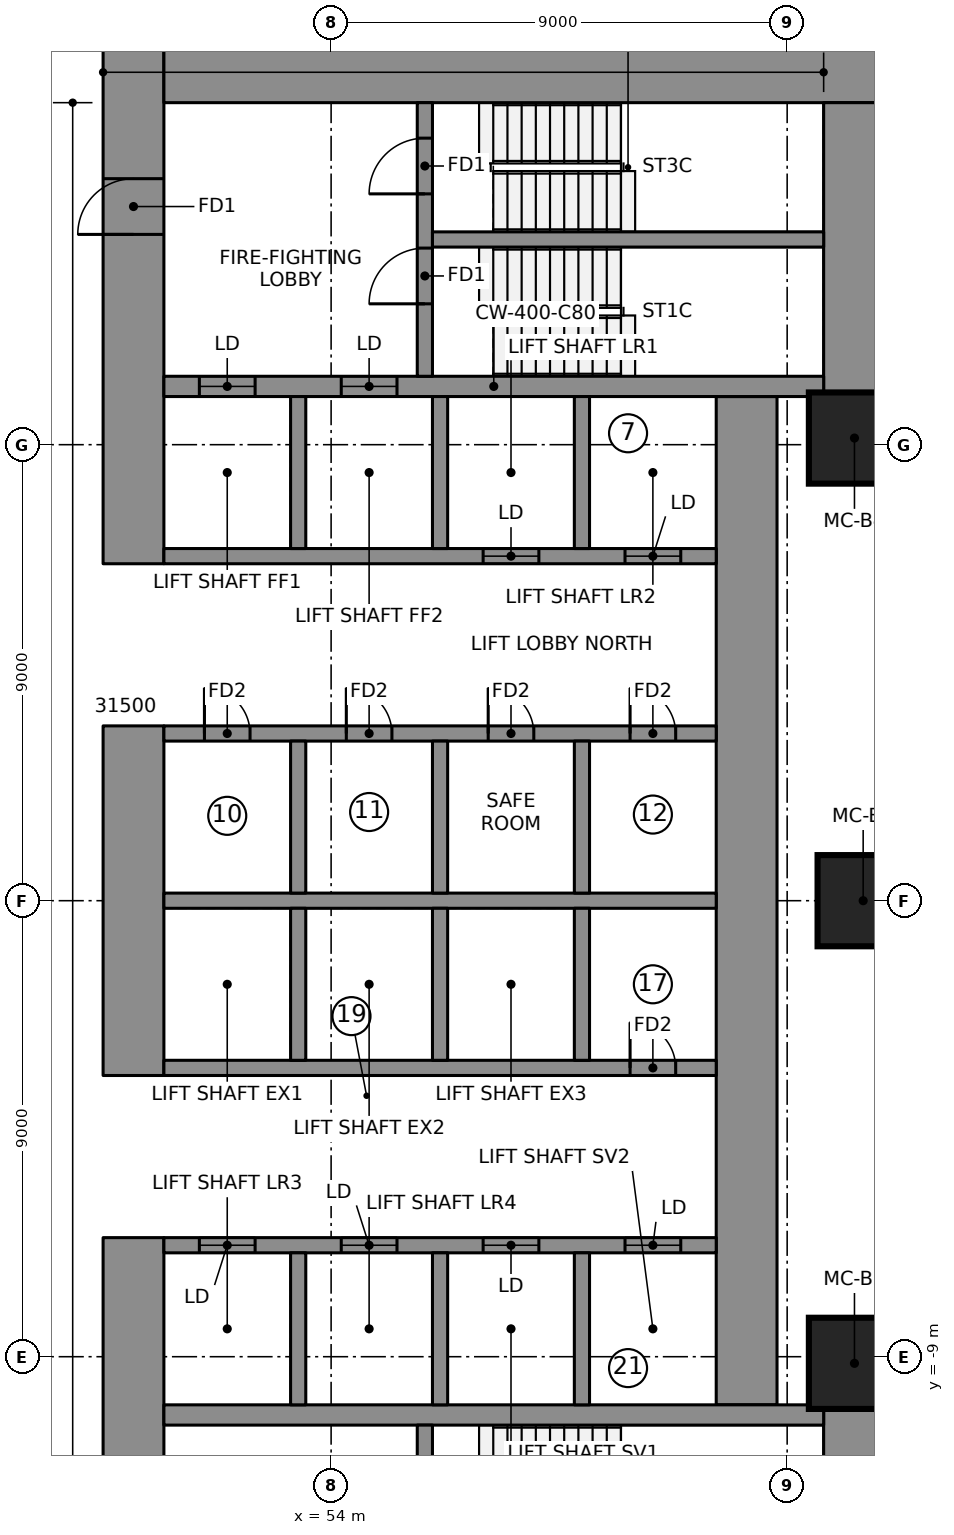
"""IFC4 building model, lengths in metres.
Left out: names, types, materials, properties, quantities, classifications, styles, units other than length and angle.
Written with IfcOpenShell. Run it as: python <this file> out.ifc"""

import sys

from ifc_helpers import new_model, si_unit, direction, frame, frame_2d, origin, origin_2d, place, context, subcontext, project, spatial, rectangle, extrude, element, fill, save


model = new_model("IFC4")
c1 = context("Model", 3, precision=1e-05, world=origin(), true_north=direction((0.0, 1.0)))
c2 = subcontext(c1, "Body", "Model", "MODEL_VIEW")
j1 = project(units=[si_unit("LENGTHUNIT", "METRE"), si_unit("PLANEANGLEUNIT", "RADIAN")], contexts=[c1])
p1 = place(None, origin())
s1 = spatial("IfcSite", under=j1, at=p1, CompositionType="ELEMENT")
p2 = place(p1, origin())
s2 = spatial("IfcBuilding", under=s1, at=p2, CompositionType="ELEMENT")
p3 = place(p2, frame((0.0, 0.0, 64.45)))
s3 = spatial("IfcBuildingStorey", under=s2, at=p3, CompositionType="ELEMENT", Elevation=64.45)
p4 = place(p3, frame((50.1, 6.65, 0.0), z_axis=(0.0, 0.0, 1.0), x_axis=(0.0, 1.0, 0.0)))
e1 = element("IfcWall", 1, at=p4, inside=s3, PredefinedType="SHEAR", context=c2, shape_type="SweptSolid", body=[
    extrude(rectangle(XDim=10.3, YDim=1.2, at=frame_2d((5.15, 0.0))), origin(), (0.0, 0.0, 1.0), 3.55),
])
p5 = place(p4, frame((6.5, 0.0, 0.0)))
e2 = element("IfcOpeningElement", 2, at=p5, cuts=e1, PredefinedType="OPENING", context=c2, shape_type="SweptSolid", body=[
    extrude(rectangle(XDim=1.1, YDim=2.1, at=frame_2d((0.55, 1.05))), frame((0.0, 0.61, 0.0), z_axis=(0.0, -1.0, 0.0), x_axis=(1.0, 0.0, 0.0)), (0.0, 0.0, 1.0), 1.22),
])
p6 = place(p3, frame((50.1, -3.45, 0.0), z_axis=(0.0, 0.0, 1.0), x_axis=(0.0, 1.0, 0.0)))
e3 = element("IfcWall", 3, at=p6, inside=s3, PredefinedType="SHEAR", context=c2, shape_type="SweptSolid", body=[
    extrude(rectangle(XDim=6.9, YDim=1.2, at=frame_2d((3.45, 0.0))), origin(), (0.0, 0.0, 1.0), 3.55),
])
p7 = place(p3, frame((50.1, -16.95, 0.0), z_axis=(0.0, 0.0, 1.0), x_axis=(0.0, 1.0, 0.0)))
e4 = element("IfcWall", 4, at=p7, inside=s3, PredefinedType="SHEAR", context=c2, shape_type="SweptSolid", body=[
    extrude(rectangle(XDim=10.3, YDim=1.2, at=frame_2d((5.15, 0.0))), origin(), (0.0, 0.0, 1.0), 3.55),
])
p8 = place(p7, frame((2.7, 0.0, 0.0)))
e5 = element("IfcOpeningElement", 5, at=p8, cuts=e4, PredefinedType="OPENING", context=c2, shape_type="SweptSolid", body=[
    extrude(rectangle(XDim=1.1, YDim=2.1, at=frame_2d((0.55, 1.05))), frame((0.0, 0.61, 0.0), z_axis=(0.0, -1.0, 0.0), x_axis=(1.0, 0.0, 0.0)), (0.0, 0.0, 1.0), 1.22),
])
p9 = place(p3, frame((50.7, 16.35, 0.0), z_axis=(0.0, 0.0, 1.0), x_axis=(1.0, 0.0, 0.0)))
e6 = element("IfcWall", 6, at=p9, inside=s3, PredefinedType="SHEAR", context=c2, shape_type="SweptSolid", body=[
    extrude(rectangle(XDim=14.22, YDim=1.2, at=frame_2d((7.11, 0.0))), origin(), (0.0, 0.0, 1.0), 3.55),
])
for number, where, z_axis, x_axis in (
    (7, (64.32, 9.95, 0.0), (0.0, 0.0, 1.0), (0.0, 1.0, 0.0)),
    (8, (64.32, -15.75, 0.0), (0.0, 0.0, 1.0), (0.0, 1.0, 0.0)),
):
    element("IfcWall", number, at=place(p3, frame(where, z_axis=z_axis, x_axis=x_axis)), inside=s3, PredefinedType="SHEAR", context=c2, shape_type="SweptSolid", body=[
        extrude(rectangle(XDim=5.8, YDim=1.2, at=frame_2d((2.9, 0.0))), origin(), (0.0, 0.0, 1.0), 3.55),
    ])
p10 = place(p3, frame((62.2, -9.95, 0.0), z_axis=(0.0, 0.0, 1.0), x_axis=(0.0, 1.0, 0.0)))
e9 = element("IfcWall", 9, at=p10, inside=s3, PredefinedType="SHEAR", context=c2, shape_type="SweptSolid", body=[
    extrude(rectangle(XDim=19.9, YDim=1.2, at=frame_2d((9.95, 0.0))), origin(), (0.0, 0.0, 1.0), 3.55),
])
p11 = place(p3, frame((50.7, 10.15, 0.0), z_axis=(0.0, 0.0, 1.0), x_axis=(1.0, 0.0, 0.0)))
e10 = element("IfcWall", 10, at=p11, inside=s3, PredefinedType="SHEAR", context=c2, shape_type="SweptSolid", body=[
    extrude(rectangle(XDim=13.02, YDim=0.4, at=frame_2d((6.51, 0.0))), origin(), (0.0, 0.0, 1.0), 3.55),
])
p12 = place(p11, frame((0.7, 0.0, 0.0)))
e11 = element("IfcOpeningElement", 11, at=p12, cuts=e10, PredefinedType="OPENING", context=c2, shape_type="SweptSolid", body=[
    extrude(rectangle(XDim=1.1, YDim=2.1, at=frame_2d((0.55, 1.05))), frame((0.0, 0.21, 0.0), z_axis=(0.0, -1.0, 0.0), x_axis=(1.0, 0.0, 0.0)), (0.0, 0.0, 1.0), 0.42),
])
p13 = place(p11, frame((3.5, 0.0, 0.0)))
e12 = element("IfcOpeningElement", 12, at=p13, cuts=e10, PredefinedType="OPENING", context=c2, shape_type="SweptSolid", body=[
    extrude(rectangle(XDim=1.1, YDim=2.1, at=frame_2d((0.55, 1.05))), frame((0.0, 0.21, 0.0), z_axis=(0.0, -1.0, 0.0), x_axis=(1.0, 0.0, 0.0)), (0.0, 0.0, 1.0), 0.42),
])
p14 = place(p3, frame((50.7, -10.15, 0.0), z_axis=(0.0, 0.0, 1.0), x_axis=(1.0, 0.0, 0.0)))
e13 = element("IfcWall", 13, at=p14, inside=s3, PredefinedType="SHEAR", context=c2, shape_type="SweptSolid", body=[
    extrude(rectangle(XDim=13.02, YDim=0.4, at=frame_2d((6.51, 0.0))), origin(), (0.0, 0.0, 1.0), 3.55),
])
p15 = place(p3, frame((50.7, 0.0, 0.0), z_axis=(0.0, 0.0, 1.0), x_axis=(1.0, 0.0, 0.0)))
e14 = element("IfcWall", 14, at=p15, inside=s3, PredefinedType="SHEAR", context=c2, shape_type="SweptSolid", body=[
    extrude(rectangle(XDim=10.9, YDim=0.3, at=frame_2d((5.45, 0.0))), origin(), (0.0, 0.0, 1.0), 3.55),
])
p16 = place(p3, frame((50.7, 3.3, 0.0), z_axis=(0.0, 0.0, 1.0), x_axis=(1.0, 0.0, 0.0)))
e15 = element("IfcWall", 15, at=p16, inside=s3, PredefinedType="SHEAR", context=c2, shape_type="SweptSolid", body=[
    extrude(rectangle(XDim=10.9, YDim=0.3, at=frame_2d((5.45, 0.0))), origin(), (0.0, 0.0, 1.0), 3.55),
])
p17 = place(p16, frame((0.8, 0.0, 0.0)))
e16 = element("IfcOpeningElement", 16, at=p17, cuts=e15, PredefinedType="OPENING", context=c2, shape_type="SweptSolid", body=[
    extrude(rectangle(XDim=0.9, YDim=2.1, at=frame_2d((0.45, 1.05))), frame((0.0, 0.16, 0.0), z_axis=(0.0, -1.0, 0.0), x_axis=(1.0, 0.0, 0.0)), (0.0, 0.0, 1.0), 0.32),
])
p18 = place(p16, frame((3.6, 0.0, 0.0)))
e17 = element("IfcOpeningElement", 17, at=p18, cuts=e15, PredefinedType="OPENING", context=c2, shape_type="SweptSolid", body=[
    extrude(rectangle(XDim=0.9, YDim=2.1, at=frame_2d((0.45, 1.05))), frame((0.0, 0.16, 0.0), z_axis=(0.0, -1.0, 0.0), x_axis=(1.0, 0.0, 0.0)), (0.0, 0.0, 1.0), 0.32),
])
p19 = place(p16, frame((6.4, 0.0, 0.0)))
e18 = element("IfcOpeningElement", 18, at=p19, cuts=e15, PredefinedType="OPENING", context=c2, shape_type="SweptSolid", body=[
    extrude(rectangle(XDim=0.9, YDim=2.1, at=frame_2d((0.45, 1.05))), frame((0.0, 0.16, 0.0), z_axis=(0.0, -1.0, 0.0), x_axis=(1.0, 0.0, 0.0)), (0.0, 0.0, 1.0), 0.32),
])
p20 = place(p16, frame((9.2, 0.0, 0.0)))
e19 = element("IfcOpeningElement", 19, at=p20, cuts=e15, PredefinedType="OPENING", context=c2, shape_type="SweptSolid", body=[
    extrude(rectangle(XDim=0.9, YDim=2.1, at=frame_2d((0.45, 1.05))), frame((0.0, 0.16, 0.0), z_axis=(0.0, -1.0, 0.0), x_axis=(1.0, 0.0, 0.0)), (0.0, 0.0, 1.0), 0.32),
])
p21 = place(p3, frame((50.7, 6.8, 0.0), z_axis=(0.0, 0.0, 1.0), x_axis=(1.0, 0.0, 0.0)))
e20 = element("IfcWall", 20, at=p21, inside=s3, PredefinedType="SHEAR", context=c2, shape_type="SweptSolid", body=[
    extrude(rectangle(XDim=10.9, YDim=0.3, at=frame_2d((5.45, 0.0))), origin(), (0.0, 0.0, 1.0), 3.55),
])
p22 = place(p21, frame((6.3, 0.0, 0.0)))
e21 = element("IfcOpeningElement", 21, at=p22, cuts=e20, PredefinedType="OPENING", context=c2, shape_type="SweptSolid", body=[
    extrude(rectangle(XDim=1.1, YDim=2.1, at=frame_2d((0.55, 1.05))), frame((0.0, 0.16, 0.0), z_axis=(0.0, -1.0, 0.0), x_axis=(1.0, 0.0, 0.0)), (0.0, 0.0, 1.0), 0.32),
])
p23 = place(p21, frame((9.1, 0.0, 0.0)))
e22 = element("IfcOpeningElement", 22, at=p23, cuts=e20, PredefinedType="OPENING", context=c2, shape_type="SweptSolid", body=[
    extrude(rectangle(XDim=1.1, YDim=2.1, at=frame_2d((0.55, 1.05))), frame((0.0, 0.16, 0.0), z_axis=(0.0, -1.0, 0.0), x_axis=(1.0, 0.0, 0.0)), (0.0, 0.0, 1.0), 0.32),
])
for number, where, z_axis, x_axis in (
    (23, (53.35, 0.15, 0.0), (0.0, 0.0, 1.0), (0.0, 1.0, 0.0)),
    (24, (53.35, 6.95, 0.0), (0.0, 0.0, 1.0), (0.0, 1.0, 0.0)),
    (25, (56.15, 0.15, 0.0), (0.0, 0.0, 1.0), (0.0, 1.0, 0.0)),
    (26, (56.15, 6.95, 0.0), (0.0, 0.0, 1.0), (0.0, 1.0, 0.0)),
    (27, (58.95, 0.15, 0.0), (0.0, 0.0, 1.0), (0.0, 1.0, 0.0)),
    (28, (58.95, 6.95, 0.0), (0.0, 0.0, 1.0), (0.0, 1.0, 0.0)),
):
    element("IfcWall", number, at=place(p3, frame(where, z_axis=z_axis, x_axis=x_axis)), inside=s3, PredefinedType="SHEAR", context=c2, shape_type="SweptSolid", body=[
        extrude(rectangle(XDim=3.0, YDim=0.3, at=frame_2d((1.5, 0.0))), origin(), (0.0, 0.0, 1.0), 3.55),
    ])
p24 = place(p3, frame((50.7, -3.3, 0.0), z_axis=(0.0, 0.0, 1.0), x_axis=(1.0, 0.0, 0.0)))
e29 = element("IfcWall", 29, at=p24, inside=s3, PredefinedType="SHEAR", context=c2, shape_type="SweptSolid", body=[
    extrude(rectangle(XDim=10.9, YDim=0.3, at=frame_2d((5.45, 0.0))), origin(), (0.0, 0.0, 1.0), 3.55),
])
p25 = place(p24, frame((9.2, 0.0, 0.0)))
e30 = element("IfcOpeningElement", 30, at=p25, cuts=e29, PredefinedType="OPENING", context=c2, shape_type="SweptSolid", body=[
    extrude(rectangle(XDim=0.9, YDim=2.1, at=frame_2d((0.45, 1.05))), frame((0.0, 0.16, 0.0), z_axis=(0.0, -1.0, 0.0), x_axis=(1.0, 0.0, 0.0)), (0.0, 0.0, 1.0), 0.32),
])
p26 = place(p3, frame((50.7, -6.8, 0.0), z_axis=(0.0, 0.0, 1.0), x_axis=(1.0, 0.0, 0.0)))
e31 = element("IfcWall", 31, at=p26, inside=s3, PredefinedType="SHEAR", context=c2, shape_type="SweptSolid", body=[
    extrude(rectangle(XDim=10.9, YDim=0.3, at=frame_2d((5.45, 0.0))), origin(), (0.0, 0.0, 1.0), 3.55),
])
p27 = place(p26, frame((0.7, 0.0, 0.0)))
e32 = element("IfcOpeningElement", 32, at=p27, cuts=e31, PredefinedType="OPENING", context=c2, shape_type="SweptSolid", body=[
    extrude(rectangle(XDim=1.1, YDim=2.1, at=frame_2d((0.55, 1.05))), frame((0.0, 0.16, 0.0), z_axis=(0.0, -1.0, 0.0), x_axis=(1.0, 0.0, 0.0)), (0.0, 0.0, 1.0), 0.32),
])
p28 = place(p26, frame((3.5, 0.0, 0.0)))
e33 = element("IfcOpeningElement", 33, at=p28, cuts=e31, PredefinedType="OPENING", context=c2, shape_type="SweptSolid", body=[
    extrude(rectangle(XDim=1.1, YDim=2.1, at=frame_2d((0.55, 1.05))), frame((0.0, 0.16, 0.0), z_axis=(0.0, -1.0, 0.0), x_axis=(1.0, 0.0, 0.0)), (0.0, 0.0, 1.0), 0.32),
])
p29 = place(p26, frame((6.3, 0.0, 0.0)))
e34 = element("IfcOpeningElement", 34, at=p29, cuts=e31, PredefinedType="OPENING", context=c2, shape_type="SweptSolid", body=[
    extrude(rectangle(XDim=1.1, YDim=2.1, at=frame_2d((0.55, 1.05))), frame((0.0, 0.16, 0.0), z_axis=(0.0, -1.0, 0.0), x_axis=(1.0, 0.0, 0.0)), (0.0, 0.0, 1.0), 0.32),
])
p30 = place(p26, frame((9.1, 0.0, 0.0)))
e35 = element("IfcOpeningElement", 35, at=p30, cuts=e31, PredefinedType="OPENING", context=c2, shape_type="SweptSolid", body=[
    extrude(rectangle(XDim=1.1, YDim=2.1, at=frame_2d((0.55, 1.05))), frame((0.0, 0.16, 0.0), z_axis=(0.0, -1.0, 0.0), x_axis=(1.0, 0.0, 0.0)), (0.0, 0.0, 1.0), 0.32),
])
for number, where, z_axis, x_axis in (
    (36, (53.35, -3.15, 0.0), (0.0, 0.0, 1.0), (0.0, 1.0, 0.0)),
    (37, (53.35, -9.95, 0.0), (0.0, 0.0, 1.0), (0.0, 1.0, 0.0)),
    (38, (56.15, -3.15, 0.0), (0.0, 0.0, 1.0), (0.0, 1.0, 0.0)),
    (39, (56.15, -9.95, 0.0), (0.0, 0.0, 1.0), (0.0, 1.0, 0.0)),
    (40, (58.95, -3.15, 0.0), (0.0, 0.0, 1.0), (0.0, 1.0, 0.0)),
    (41, (58.95, -9.95, 0.0), (0.0, 0.0, 1.0), (0.0, 1.0, 0.0)),
):
    element("IfcWall", number, at=place(p3, frame(where, z_axis=z_axis, x_axis=x_axis)), inside=s3, PredefinedType="SHEAR", context=c2, shape_type="SweptSolid", body=[
        extrude(rectangle(XDim=3.0, YDim=0.3, at=frame_2d((1.5, 0.0))), origin(), (0.0, 0.0, 1.0), 3.55),
    ])
p31 = place(p3, frame((55.85, 10.35, 0.0), z_axis=(0.0, 0.0, 1.0), x_axis=(0.0, 1.0, 0.0)))
e42 = element("IfcWall", 42, at=p31, inside=s3, PredefinedType="SHEAR", context=c2, shape_type="SweptSolid", body=[
    extrude(rectangle(XDim=5.4, YDim=0.3, at=frame_2d((2.7, 0.0))), origin(), (0.0, 0.0, 1.0), 3.55),
])
p32 = place(p31, frame((1.43, 0.0, 0.0)))
e43 = element("IfcOpeningElement", 43, at=p32, cuts=e42, PredefinedType="OPENING", context=c2, shape_type="SweptSolid", body=[
    extrude(rectangle(XDim=1.1, YDim=2.1, at=frame_2d((0.55, 1.05))), frame((0.0, 0.16, 0.0), z_axis=(0.0, -1.0, 0.0), x_axis=(1.0, 0.0, 0.0)), (0.0, 0.0, 1.0), 0.32),
])
p33 = place(p31, frame((3.6, 0.0, 0.0)))
e44 = element("IfcOpeningElement", 44, at=p33, cuts=e42, PredefinedType="OPENING", context=c2, shape_type="SweptSolid", body=[
    extrude(rectangle(XDim=1.1, YDim=2.1, at=frame_2d((0.55, 1.05))), frame((0.0, 0.16, 0.0), z_axis=(0.0, -1.0, 0.0), x_axis=(1.0, 0.0, 0.0)), (0.0, 0.0, 1.0), 0.32),
])
p34 = place(p3, frame((55.85, -15.75, 0.0), z_axis=(0.0, 0.0, 1.0), x_axis=(0.0, 1.0, 0.0)))
e45 = element("IfcWall", 45, at=p34, inside=s3, PredefinedType="SHEAR", context=c2, shape_type="SweptSolid", body=[
    extrude(rectangle(XDim=5.4, YDim=0.3, at=frame_2d((2.7, 0.0))), origin(), (0.0, 0.0, 1.0), 3.55),
])
p35 = place(p34, frame((3.6, 0.0, 0.0)))
e46 = element("IfcOpeningElement", 46, at=p35, cuts=e45, PredefinedType="OPENING", context=c2, shape_type="SweptSolid", body=[
    extrude(rectangle(XDim=1.1, YDim=2.1, at=frame_2d((0.55, 1.05))), frame((0.0, 0.16, 0.0), z_axis=(0.0, -1.0, 0.0), x_axis=(1.0, 0.0, 0.0)), (0.0, 0.0, 1.0), 0.32),
])
p36 = place(p34, frame((0.8, 0.0, 0.0)))
e47 = element("IfcOpeningElement", 47, at=p36, cuts=e45, PredefinedType="OPENING", context=c2, shape_type="SweptSolid", body=[
    extrude(rectangle(XDim=0.9, YDim=2.1, at=frame_2d((0.45, 1.05))), frame((0.0, 0.16, 0.0), z_axis=(0.0, -1.0, 0.0), x_axis=(1.0, 0.0, 0.0)), (0.0, 0.0, 1.0), 0.32),
])
p37 = place(p3, frame((56.0, 13.05, 0.0), z_axis=(0.0, 0.0, 1.0), x_axis=(1.0, 0.0, 0.0)))
e48 = element("IfcWall", 48, at=p37, inside=s3, PredefinedType="SHEAR", context=c2, shape_type="SweptSolid", body=[
    extrude(rectangle(XDim=7.72, YDim=0.3, at=frame_2d((3.86, 0.0))), origin(), (0.0, 0.0, 1.0), 3.55),
])
for number, where, z_axis, x_axis in (
    (49, (64.328, -9.131, 0.0), (0.0, 0.0, 1.0), (1.0, 0.0, 0.0)),
    (50, (64.5, 0.0, 0.0), (0.0, 0.0, 1.0), (1.0, 0.0, 0.0)),
    (51, (64.328, 9.131, 0.0), (0.0, 0.0, 1.0), (1.0, 0.0, 0.0)),
):
    element("IfcColumn", number, at=place(p3, frame(where, z_axis=z_axis, x_axis=x_axis)), inside=s3, PredefinedType="COLUMN", context=c2, shape_type="SweptSolid", body=[
        extrude(rectangle(XDim=1.8, YDim=1.8, at=origin_2d()), origin(), (0.0, 0.0, 1.0), 3.55),
    ])
p38 = place(p12, origin())
e52 = element("IfcDoor", 52, at=p38, inside=s3, OperationType="DOUBLE_DOOR_SLIDING", PredefinedType="DOOR", context=c2, shape_type="SweptSolid", body=[
    extrude(rectangle(XDim=1.1, YDim=2.1, at=frame_2d((0.55, 1.05))), frame((0.0, 0.025, 0.0), z_axis=(0.0, -1.0, 0.0), x_axis=(1.0, 0.0, 0.0)), (0.0, 0.0, 1.0), 0.05),
])
fill(e11, e52)
p39 = place(p13, origin())
e53 = element("IfcDoor", 53, at=p39, inside=s3, OperationType="DOUBLE_DOOR_SLIDING", PredefinedType="DOOR", context=c2, shape_type="SweptSolid", body=[
    extrude(rectangle(XDim=1.1, YDim=2.1, at=frame_2d((0.55, 1.05))), frame((0.0, 0.025, 0.0), z_axis=(0.0, -1.0, 0.0), x_axis=(1.0, 0.0, 0.0)), (0.0, 0.0, 1.0), 0.05),
])
fill(e12, e53)
p40 = place(p22, origin())
e54 = element("IfcDoor", 54, at=p40, inside=s3, OperationType="DOUBLE_DOOR_SLIDING", PredefinedType="DOOR", context=c2, shape_type="SweptSolid", body=[
    extrude(rectangle(XDim=1.1, YDim=2.1, at=frame_2d((0.55, 1.05))), frame((0.0, 0.025, 0.0), z_axis=(0.0, -1.0, 0.0), x_axis=(1.0, 0.0, 0.0)), (0.0, 0.0, 1.0), 0.05),
])
fill(e21, e54)
p41 = place(p23, origin())
e55 = element("IfcDoor", 55, at=p41, inside=s3, OperationType="DOUBLE_DOOR_SLIDING", PredefinedType="DOOR", context=c2, shape_type="SweptSolid", body=[
    extrude(rectangle(XDim=1.1, YDim=2.1, at=frame_2d((0.55, 1.05))), frame((0.0, 0.025, 0.0), z_axis=(0.0, -1.0, 0.0), x_axis=(1.0, 0.0, 0.0)), (0.0, 0.0, 1.0), 0.05),
])
fill(e22, e55)
p42 = place(p27, origin())
e56 = element("IfcDoor", 56, at=p42, inside=s3, OperationType="DOUBLE_DOOR_SLIDING", PredefinedType="DOOR", context=c2, shape_type="SweptSolid", body=[
    extrude(rectangle(XDim=1.1, YDim=2.1, at=frame_2d((0.55, 1.05))), frame((0.0, 0.025, 0.0), z_axis=(0.0, -1.0, 0.0), x_axis=(1.0, 0.0, 0.0)), (0.0, 0.0, 1.0), 0.05),
])
fill(e32, e56)
p43 = place(p28, origin())
e57 = element("IfcDoor", 57, at=p43, inside=s3, OperationType="DOUBLE_DOOR_SLIDING", PredefinedType="DOOR", context=c2, shape_type="SweptSolid", body=[
    extrude(rectangle(XDim=1.1, YDim=2.1, at=frame_2d((0.55, 1.05))), frame((0.0, 0.025, 0.0), z_axis=(0.0, -1.0, 0.0), x_axis=(1.0, 0.0, 0.0)), (0.0, 0.0, 1.0), 0.05),
])
fill(e33, e57)
p44 = place(p29, origin())
e58 = element("IfcDoor", 58, at=p44, inside=s3, OperationType="DOUBLE_DOOR_SLIDING", PredefinedType="DOOR", context=c2, shape_type="SweptSolid", body=[
    extrude(rectangle(XDim=1.1, YDim=2.1, at=frame_2d((0.55, 1.05))), frame((0.0, 0.025, 0.0), z_axis=(0.0, -1.0, 0.0), x_axis=(1.0, 0.0, 0.0)), (0.0, 0.0, 1.0), 0.05),
])
fill(e34, e58)
p45 = place(p30, origin())
e59 = element("IfcDoor", 59, at=p45, inside=s3, OperationType="DOUBLE_DOOR_SLIDING", PredefinedType="DOOR", context=c2, shape_type="SweptSolid", body=[
    extrude(rectangle(XDim=1.1, YDim=2.1, at=frame_2d((0.55, 1.05))), frame((0.0, 0.025, 0.0), z_axis=(0.0, -1.0, 0.0), x_axis=(1.0, 0.0, 0.0)), (0.0, 0.0, 1.0), 0.05),
])
fill(e35, e59)
p46 = place(p32, origin())
e60 = element("IfcDoor", 60, at=p46, inside=s3, OperationType="SINGLE_SWING_RIGHT", PredefinedType="DOOR", context=c2, shape_type="SweptSolid", body=[
    extrude(rectangle(XDim=1.1, YDim=2.1, at=frame_2d((0.55, 1.05))), frame((0.0, 0.025, 0.0), z_axis=(0.0, -1.0, 0.0), x_axis=(1.0, 0.0, 0.0)), (0.0, 0.0, 1.0), 0.05),
])
fill(e43, e60)
p47 = place(p33, origin())
e61 = element("IfcDoor", 61, at=p47, inside=s3, OperationType="SINGLE_SWING_RIGHT", PredefinedType="DOOR", context=c2, shape_type="SweptSolid", body=[
    extrude(rectangle(XDim=1.1, YDim=2.1, at=frame_2d((0.55, 1.05))), frame((0.0, 0.025, 0.0), z_axis=(0.0, -1.0, 0.0), x_axis=(1.0, 0.0, 0.0)), (0.0, 0.0, 1.0), 0.05),
])
fill(e44, e61)
p48 = place(p5, origin())
e62 = element("IfcDoor", 62, at=p48, inside=s3, OperationType="SINGLE_SWING_RIGHT", PredefinedType="DOOR", context=c2, shape_type="SweptSolid", body=[
    extrude(rectangle(XDim=1.1, YDim=2.1, at=frame_2d((0.55, 1.05))), frame((0.0, 0.025, 0.0), z_axis=(0.0, -1.0, 0.0), x_axis=(1.0, 0.0, 0.0)), (0.0, 0.0, 1.0), 0.05),
])
fill(e2, e62)
p49 = place(p17, origin())
e63 = element("IfcDoor", 63, at=p49, inside=s3, OperationType="SINGLE_SWING_LEFT", PredefinedType="DOOR", context=c2, shape_type="SweptSolid", body=[
    extrude(rectangle(XDim=0.9, YDim=2.1, at=frame_2d((0.45, 1.05))), frame((0.0, 0.025, 0.0), z_axis=(0.0, -1.0, 0.0), x_axis=(1.0, 0.0, 0.0)), (0.0, 0.0, 1.0), 0.05),
])
fill(e16, e63)
p50 = place(p18, origin())
e64 = element("IfcDoor", 64, at=p50, inside=s3, OperationType="SINGLE_SWING_LEFT", PredefinedType="DOOR", context=c2, shape_type="SweptSolid", body=[
    extrude(rectangle(XDim=0.9, YDim=2.1, at=frame_2d((0.45, 1.05))), frame((0.0, 0.025, 0.0), z_axis=(0.0, -1.0, 0.0), x_axis=(1.0, 0.0, 0.0)), (0.0, 0.0, 1.0), 0.05),
])
fill(e17, e64)
p51 = place(p19, origin())
e65 = element("IfcDoor", 65, at=p51, inside=s3, OperationType="SINGLE_SWING_LEFT", PredefinedType="DOOR", context=c2, shape_type="SweptSolid", body=[
    extrude(rectangle(XDim=0.9, YDim=2.1, at=frame_2d((0.45, 1.05))), frame((0.0, 0.025, 0.0), z_axis=(0.0, -1.0, 0.0), x_axis=(1.0, 0.0, 0.0)), (0.0, 0.0, 1.0), 0.05),
])
fill(e18, e65)
p52 = place(p20, origin())
e66 = element("IfcDoor", 66, at=p52, inside=s3, OperationType="SINGLE_SWING_LEFT", PredefinedType="DOOR", context=c2, shape_type="SweptSolid", body=[
    extrude(rectangle(XDim=0.9, YDim=2.1, at=frame_2d((0.45, 1.05))), frame((0.0, 0.025, 0.0), z_axis=(0.0, -1.0, 0.0), x_axis=(1.0, 0.0, 0.0)), (0.0, 0.0, 1.0), 0.05),
])
fill(e19, e66)
p53 = place(p25, origin())
e67 = element("IfcDoor", 67, at=p53, inside=s3, OperationType="SINGLE_SWING_LEFT", PredefinedType="DOOR", context=c2, shape_type="SweptSolid", body=[
    extrude(rectangle(XDim=0.9, YDim=2.1, at=frame_2d((0.45, 1.05))), frame((0.0, 0.025, 0.0), z_axis=(0.0, -1.0, 0.0), x_axis=(1.0, 0.0, 0.0)), (0.0, 0.0, 1.0), 0.05),
])
fill(e30, e67)
save(model, sys.argv[1])
